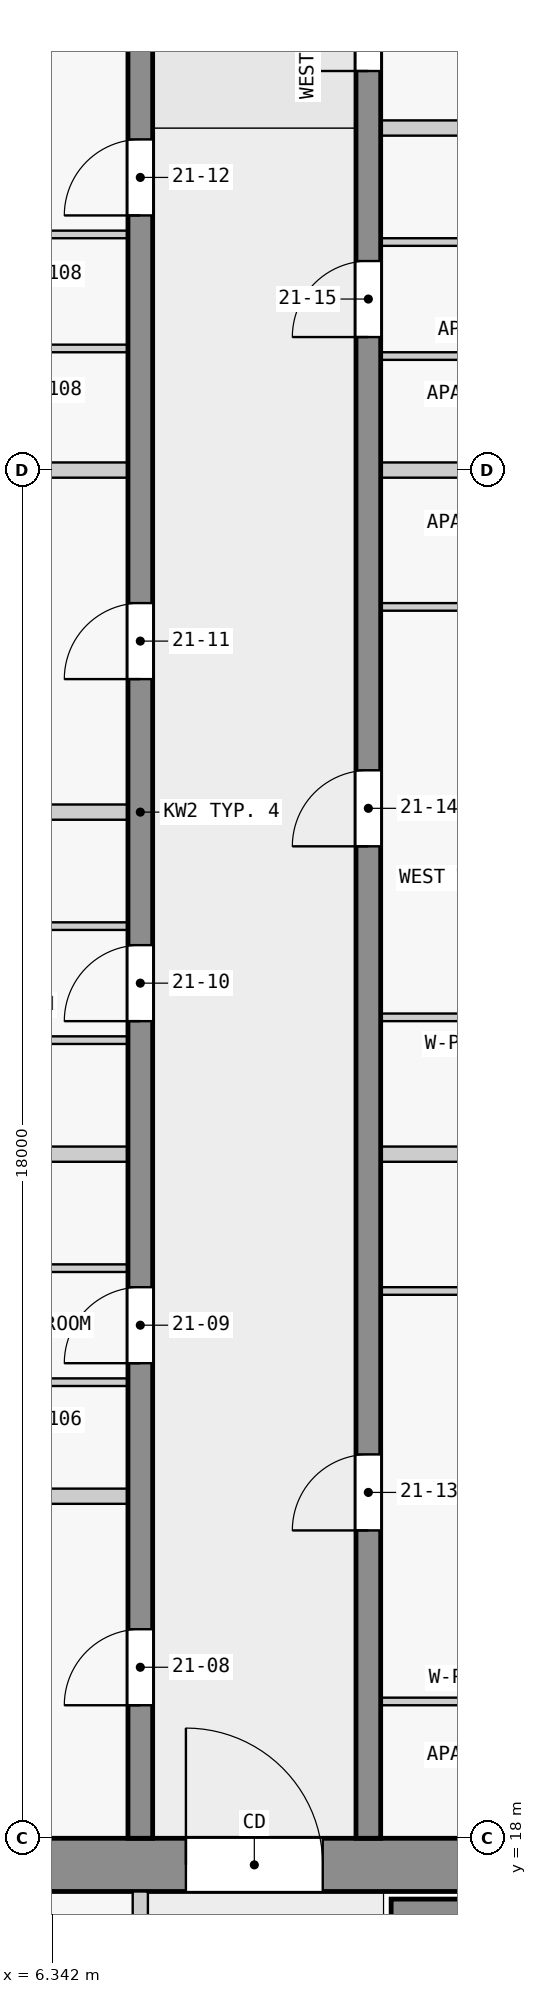
"""IFC4 building model, lengths in metres.
Left out: names, types, materials, properties, quantities, classifications, styles, units other than length and angle.
Written with IfcOpenShell. Run it as: python <this file> out.ifc"""

import sys

from ifc_helpers import new_model, si_unit, direction, frame, frame_2d, origin, place, context, subcontext, project, spatial, rectangle, extrude, element, fill, save


model = new_model("IFC4")
c1 = context("Model", 3, precision=1e-05, world=origin(), true_north=direction((0.0, 1.0)))
c2 = subcontext(c1, "Body", "Model", "MODEL_VIEW")
j1 = project(units=[si_unit("LENGTHUNIT", "METRE"), si_unit("PLANEANGLEUNIT", "RADIAN")], contexts=[c1])
p1 = place(None, origin())
s1 = spatial("IfcSite", under=j1, at=p1, CompositionType="ELEMENT")
p2 = place(p1, origin())
s2 = spatial("IfcBuilding", under=s1, at=p2, CompositionType="ELEMENT")
p3 = place(p2, frame((0.0, 0.0, 85.3)))
s3 = spatial("IfcBuildingStorey", under=s2, at=p3, CompositionType="ELEMENT", Elevation=85.3)
p4 = place(p3, frame((1.6, 17.65, 0.0), z_axis=(0.0, 0.0, 1.0), x_axis=(1.0, 0.0, 0.0)))
e1 = element("IfcWall", 1, at=p4, inside=s3, PredefinedType="SHEAR", context=c2, shape_type="SweptSolid", body=[
    extrude(rectangle(XDim=20.9, YDim=0.7, at=frame_2d((10.45, 0.0))), origin(), (0.0, 0.0, 1.0), 3.25),
])
p5 = place(p4, frame((6.5, 0.0, 0.0)))
e2 = element("IfcOpeningElement", 2, at=p5, cuts=e1, PredefinedType="OPENING", context=c2, shape_type="SweptSolid", body=[
    extrude(rectangle(XDim=1.8, YDim=2.1, at=frame_2d((0.9, 1.05))), frame((0.0, 0.36, 0.0), z_axis=(0.0, -1.0, 0.0), x_axis=(1.0, 0.0, 0.0)), (0.0, 0.0, 1.0), 0.72),
])
p6 = place(p3, frame((10.8, 17.05, 0.0), z_axis=(0.0, 0.0, 1.0), x_axis=(1.0, 0.0, 0.0)))
e3 = element("IfcWall", 3, at=p6, inside=s3, PredefinedType="SHEAR", context=c2, shape_type="SweptSolid", body=[
    extrude(rectangle(XDim=7.8, YDim=0.3, at=frame_2d((3.9, 0.0))), origin(), (0.0, 0.0, 1.0), 3.25),
])
p7 = place(p3, frame((7.5, 18.0, 0.0), z_axis=(0.0, 0.0, 1.0), x_axis=(0.0, 1.0, 0.0)))
e4 = element("IfcWall", 4, at=p7, inside=s3, PredefinedType="SHEAR", context=c2, shape_type="SweptSolid", body=[
    extrude(rectangle(XDim=27.0, YDim=0.325, at=frame_2d((13.5, 0.0))), origin(), (0.0, 0.0, 1.0), 3.25),
])
p8 = place(p7, frame((1.75, 0.0, 0.0)))
e5 = element("IfcOpeningElement", 5, at=p8, cuts=e4, PredefinedType="OPENING", context=c2, shape_type="SweptSolid", body=[
    extrude(rectangle(XDim=1.0, YDim=2.1, at=frame_2d((0.5, 1.05))), frame((0.0, 0.172, 0.0), z_axis=(0.0, -1.0, 0.0), x_axis=(1.0, 0.0, 0.0)), (0.0, 0.0, 1.0), 0.345),
])
p9 = place(p7, frame((6.25, 0.0, 0.0)))
e6 = element("IfcOpeningElement", 6, at=p9, cuts=e4, PredefinedType="OPENING", context=c2, shape_type="SweptSolid", body=[
    extrude(rectangle(XDim=1.0, YDim=2.1, at=frame_2d((0.5, 1.05))), frame((0.0, 0.172, 0.0), z_axis=(0.0, -1.0, 0.0), x_axis=(1.0, 0.0, 0.0)), (0.0, 0.0, 1.0), 0.345),
])
p10 = place(p7, frame((10.75, 0.0, 0.0)))
e7 = element("IfcOpeningElement", 7, at=p10, cuts=e4, PredefinedType="OPENING", context=c2, shape_type="SweptSolid", body=[
    extrude(rectangle(XDim=1.0, YDim=2.1, at=frame_2d((0.5, 1.05))), frame((0.0, 0.172, 0.0), z_axis=(0.0, -1.0, 0.0), x_axis=(1.0, 0.0, 0.0)), (0.0, 0.0, 1.0), 0.345),
])
p11 = place(p7, frame((15.25, 0.0, 0.0)))
e8 = element("IfcOpeningElement", 8, at=p11, cuts=e4, PredefinedType="OPENING", context=c2, shape_type="SweptSolid", body=[
    extrude(rectangle(XDim=1.0, YDim=2.1, at=frame_2d((0.5, 1.05))), frame((0.0, 0.172, 0.0), z_axis=(0.0, -1.0, 0.0), x_axis=(1.0, 0.0, 0.0)), (0.0, 0.0, 1.0), 0.345),
])
p12 = place(p7, frame((21.35, 0.0, 0.0)))
e9 = element("IfcOpeningElement", 9, at=p12, cuts=e4, PredefinedType="OPENING", context=c2, shape_type="SweptSolid", body=[
    extrude(rectangle(XDim=1.0, YDim=2.1, at=frame_2d((0.5, 1.05))), frame((0.0, 0.172, 0.0), z_axis=(0.0, -1.0, 0.0), x_axis=(1.0, 0.0, 0.0)), (0.0, 0.0, 1.0), 0.345),
])
p13 = place(p3, frame((10.5, 18.0, 0.0), z_axis=(0.0, 0.0, 1.0), x_axis=(0.0, 1.0, 0.0)))
e10 = element("IfcWall", 10, at=p13, inside=s3, PredefinedType="SHEAR", context=c2, shape_type="SweptSolid", body=[
    extrude(rectangle(XDim=27.0, YDim=0.325, at=frame_2d((13.5, 0.0))), origin(), (0.0, 0.0, 1.0), 3.25),
])
p14 = place(p13, frame((4.05, 0.0, 0.0)))
e11 = element("IfcOpeningElement", 11, at=p14, cuts=e10, PredefinedType="OPENING", context=c2, shape_type="SweptSolid", body=[
    extrude(rectangle(XDim=1.0, YDim=2.1, at=frame_2d((0.5, 1.05))), frame((0.0, 0.172, 0.0), z_axis=(0.0, -1.0, 0.0), x_axis=(1.0, 0.0, 0.0)), (0.0, 0.0, 1.0), 0.345),
])
p15 = place(p13, frame((13.05, 0.0, 0.0)))
e12 = element("IfcOpeningElement", 12, at=p15, cuts=e10, PredefinedType="OPENING", context=c2, shape_type="SweptSolid", body=[
    extrude(rectangle(XDim=1.0, YDim=2.1, at=frame_2d((0.5, 1.05))), frame((0.0, 0.172, 0.0), z_axis=(0.0, -1.0, 0.0), x_axis=(1.0, 0.0, 0.0)), (0.0, 0.0, 1.0), 0.345),
])
p16 = place(p13, frame((19.75, 0.0, 0.0)))
e13 = element("IfcOpeningElement", 13, at=p16, cuts=e10, PredefinedType="OPENING", context=c2, shape_type="SweptSolid", body=[
    extrude(rectangle(XDim=1.0, YDim=2.1, at=frame_2d((0.5, 1.05))), frame((0.0, 0.172, 0.0), z_axis=(0.0, -1.0, 0.0), x_axis=(1.0, 0.0, 0.0)), (0.0, 0.0, 1.0), 0.345),
])
p17 = place(p13, frame((23.25, 0.0, 0.0)))
e14 = element("IfcOpeningElement", 14, at=p17, cuts=e10, PredefinedType="OPENING", context=c2, shape_type="SweptSolid", body=[
    extrude(rectangle(XDim=0.9, YDim=2.1, at=frame_2d((0.45, 1.05))), frame((0.0, 0.172, 0.0), z_axis=(0.0, -1.0, 0.0), x_axis=(1.0, 0.0, 0.0)), (0.0, 0.0, 1.0), 0.345),
])
p18 = place(p13, frame((25.45, 0.0, 0.0)))
e15 = element("IfcOpeningElement", 15, at=p18, cuts=e10, PredefinedType="OPENING", context=c2, shape_type="SweptSolid", body=[
    extrude(rectangle(XDim=1.0, YDim=2.1, at=frame_2d((0.5, 1.05))), frame((0.0, 0.172, 0.0), z_axis=(0.0, -1.0, 0.0), x_axis=(1.0, 0.0, 0.0)), (0.0, 0.0, 1.0), 0.345),
])
p19 = place(p3, frame((7.5, 10.1, 0.0), z_axis=(0.0, 0.0, 1.0), x_axis=(0.0, 1.0, 0.0)))
e16 = element("IfcWall", 16, at=p19, inside=s3, PredefinedType="PARTITIONING", context=c2, shape_type="SweptSolid", body=[
    extrude(rectangle(XDim=7.2, YDim=0.2, at=frame_2d((3.6, 0.0))), origin(), (0.0, 0.0, 1.0), 3.25),
])
p20 = place(p19, frame((0.75, 0.0, 0.0)))
e17 = element("IfcOpeningElement", 17, at=p20, cuts=e16, PredefinedType="OPENING", context=c2, shape_type="SweptSolid", body=[
    extrude(rectangle(XDim=0.9, YDim=2.1, at=frame_2d((0.45, 1.05))), frame((0.0, 0.11, 0.0), z_axis=(0.0, -1.0, 0.0), x_axis=(1.0, 0.0, 0.0)), (0.0, 0.0, 1.0), 0.22),
])
p21 = place(p19, frame((3.175, 0.0, 0.0)))
e18 = element("IfcOpeningElement", 18, at=p21, cuts=e16, PredefinedType="OPENING", context=c2, shape_type="SweptSolid", body=[
    extrude(rectangle(XDim=0.9, YDim=2.1, at=frame_2d((0.45, 1.05))), frame((0.0, 0.11, 0.0), z_axis=(0.0, -1.0, 0.0), x_axis=(1.0, 0.0, 0.0)), (0.0, 0.0, 1.0), 0.22),
])
p22 = place(p19, frame((5.25, 0.0, 0.0)))
e19 = element("IfcOpeningElement", 19, at=p22, cuts=e16, PredefinedType="OPENING", context=c2, shape_type="SweptSolid", body=[
    extrude(rectangle(XDim=0.9, YDim=2.1, at=frame_2d((0.45, 1.05))), frame((0.0, 0.11, 0.0), z_axis=(0.0, -1.0, 0.0), x_axis=(1.0, 0.0, 0.0)), (0.0, 0.0, 1.0), 0.22),
])
p23 = place(p3, frame((14.062, 19.8, 0.0), z_axis=(0.0, 0.0, 1.0), x_axis=(-1.0, 0.0, 0.0)))
e20 = element("IfcWall", 20, at=p23, inside=s3, PredefinedType="PARTITIONING", context=c2, shape_type="SweptSolid", body=[
    extrude(rectangle(XDim=3.4, YDim=0.1, at=frame_2d((1.7, 0.0))), origin(), (0.0, 0.0, 1.0), 3.25),
])
p24 = place(p23, frame((1.25, 0.0, 0.0)))
e21 = element("IfcOpeningElement", 21, at=p24, cuts=e20, PredefinedType="OPENING", context=c2, shape_type="SweptSolid", body=[
    extrude(rectangle(XDim=0.9, YDim=2.1, at=frame_2d((0.45, 1.05))), frame((0.0, 0.06, 0.0), z_axis=(0.0, -1.0, 0.0), x_axis=(1.0, 0.0, 0.0)), (0.0, 0.0, 1.0), 0.12),
])
p25 = place(p3, frame((7.337, 22.5, 0.0), z_axis=(0.0, 0.0, 1.0), x_axis=(-1.0, 0.0, 0.0)))
e22 = element("IfcWall", 22, at=p25, inside=s3, PredefinedType="PARTITIONING", context=c2, shape_type="SweptSolid", body=[
    extrude(rectangle(XDim=7.188, YDim=0.2, at=frame_2d((3.594, 0.0))), origin(), (0.0, 0.0, 1.0), 3.25),
])
p26 = place(p3, frame((7.337, 24.0, 0.0), z_axis=(0.0, 0.0, 1.0), x_axis=(-1.0, 0.0, 0.0)))
e23 = element("IfcWall", 23, at=p26, inside=s3, PredefinedType="PARTITIONING", context=c2, shape_type="SweptSolid", body=[
    extrude(rectangle(XDim=3.4, YDim=0.1, at=frame_2d((1.7, 0.0))), origin(), (0.0, 0.0, 1.0), 3.25),
])
p27 = place(p26, frame((1.25, 0.0, 0.0)))
e24 = element("IfcOpeningElement", 24, at=p27, cuts=e23, PredefinedType="OPENING", context=c2, shape_type="SweptSolid", body=[
    extrude(rectangle(XDim=0.9, YDim=2.1, at=frame_2d((0.45, 1.05))), frame((0.0, 0.06, 0.0), z_axis=(0.0, -1.0, 0.0), x_axis=(1.0, 0.0, 0.0)), (0.0, 0.0, 1.0), 0.12),
])
p28 = place(p3, frame((10.663, 25.2, 0.0), z_axis=(0.0, 0.0, 1.0), x_axis=(1.0, 0.0, 0.0)))
e25 = element("IfcWall", 25, at=p28, inside=s3, PredefinedType="PARTITIONING", context=c2, shape_type="SweptSolid", body=[
    extrude(rectangle(XDim=3.35, YDim=0.1, at=frame_2d((1.675, 0.0))), origin(), (0.0, 0.0, 1.0), 3.25),
])
p29 = place(p28, frame((1.25, 0.0, 0.0)))
e26 = element("IfcOpeningElement", 26, at=p29, cuts=e25, PredefinedType="OPENING", context=c2, shape_type="SweptSolid", body=[
    extrude(rectangle(XDim=0.9, YDim=2.1, at=frame_2d((0.45, 1.05))), frame((0.0, 0.06, 0.0), z_axis=(0.0, -1.0, 0.0), x_axis=(1.0, 0.0, 0.0)), (0.0, 0.0, 1.0), 0.12),
])
p30 = place(p3, frame((3.938, 25.5, 0.0), z_axis=(0.0, 0.0, 1.0), x_axis=(1.0, 0.0, 0.0)))
e27 = element("IfcWall", 27, at=p30, inside=s3, PredefinedType="PARTITIONING", context=c2, shape_type="SweptSolid", body=[
    extrude(rectangle(XDim=3.4, YDim=0.1, at=frame_2d((1.7, 0.0))), origin(), (0.0, 0.0, 1.0), 3.25),
])
p31 = place(p30, frame((1.25, 0.0, 0.0)))
e28 = element("IfcOpeningElement", 28, at=p31, cuts=e27, PredefinedType="OPENING", context=c2, shape_type="SweptSolid", body=[
    extrude(rectangle(XDim=0.9, YDim=2.1, at=frame_2d((0.45, 1.05))), frame((0.0, 0.06, 0.0), z_axis=(0.0, -1.0, 0.0), x_axis=(1.0, 0.0, 0.0)), (0.0, 0.0, 1.0), 0.12),
])
for number, where, z_axis, x_axis in (
    (29, (7.337, 27.0, 0.0), (0.0, 0.0, 1.0), (-1.0, 0.0, 0.0)),
    (30, (13.962, 27.0, 0.0), (0.0, 0.0, 1.0), (-1.0, 0.0, 0.0)),
):
    element("IfcWall", number, at=place(p3, frame(where, z_axis=z_axis, x_axis=x_axis)), inside=s3, PredefinedType="PARTITIONING", context=c2, shape_type="SweptSolid", body=[
        extrude(rectangle(XDim=3.3, YDim=0.2, at=frame_2d((1.65, 0.0))), origin(), (0.0, 0.0, 1.0), 3.25),
    ])
p32 = place(p3, frame((7.337, 28.5, 0.0), z_axis=(0.0, 0.0, 1.0), x_axis=(-1.0, 0.0, 0.0)))
e31 = element("IfcWall", 31, at=p32, inside=s3, PredefinedType="PARTITIONING", context=c2, shape_type="SweptSolid", body=[
    extrude(rectangle(XDim=3.4, YDim=0.1, at=frame_2d((1.7, 0.0))), origin(), (0.0, 0.0, 1.0), 3.25),
])
p33 = place(p32, frame((1.25, 0.0, 0.0)))
e32 = element("IfcOpeningElement", 32, at=p33, cuts=e31, PredefinedType="OPENING", context=c2, shape_type="SweptSolid", body=[
    extrude(rectangle(XDim=0.9, YDim=2.1, at=frame_2d((0.45, 1.05))), frame((0.0, 0.06, 0.0), z_axis=(0.0, -1.0, 0.0), x_axis=(1.0, 0.0, 0.0)), (0.0, 0.0, 1.0), 0.12),
])
p34 = place(p3, frame((14.012, 28.8, 0.0), z_axis=(0.0, 0.0, 1.0), x_axis=(-1.0, 0.0, 0.0)))
e33 = element("IfcWall", 33, at=p34, inside=s3, PredefinedType="PARTITIONING", context=c2, shape_type="SweptSolid", body=[
    extrude(rectangle(XDim=3.35, YDim=0.1, at=frame_2d((1.675, 0.0))), origin(), (0.0, 0.0, 1.0), 3.25),
])
p35 = place(p34, frame((1.25, 0.0, 0.0)))
e34 = element("IfcOpeningElement", 34, at=p35, cuts=e33, PredefinedType="OPENING", context=c2, shape_type="SweptSolid", body=[
    extrude(rectangle(XDim=0.9, YDim=2.1, at=frame_2d((0.45, 1.05))), frame((0.0, 0.06, 0.0), z_axis=(0.0, -1.0, 0.0), x_axis=(1.0, 0.0, 0.0)), (0.0, 0.0, 1.0), 0.12),
])
p36 = place(p3, frame((3.938, 30.0, 0.0), z_axis=(0.0, 0.0, 1.0), x_axis=(1.0, 0.0, 0.0)))
e35 = element("IfcWall", 35, at=p36, inside=s3, PredefinedType="PARTITIONING", context=c2, shape_type="SweptSolid", body=[
    extrude(rectangle(XDim=3.4, YDim=0.1, at=frame_2d((1.7, 0.0))), origin(), (0.0, 0.0, 1.0), 3.25),
])
p37 = place(p36, frame((1.25, 0.0, 0.0)))
e36 = element("IfcOpeningElement", 36, at=p37, cuts=e35, PredefinedType="OPENING", context=c2, shape_type="SweptSolid", body=[
    extrude(rectangle(XDim=0.9, YDim=2.1, at=frame_2d((0.45, 1.05))), frame((0.0, 0.06, 0.0), z_axis=(0.0, -1.0, 0.0), x_axis=(1.0, 0.0, 0.0)), (0.0, 0.0, 1.0), 0.12),
])
p38 = place(p3, frame((7.337, 31.5, 0.0), z_axis=(0.0, 0.0, 1.0), x_axis=(-1.0, 0.0, 0.0)))
e37 = element("IfcWall", 37, at=p38, inside=s3, PredefinedType="PARTITIONING", context=c2, shape_type="SweptSolid", body=[
    extrude(rectangle(XDim=3.3, YDim=0.2, at=frame_2d((1.65, 0.0))), origin(), (0.0, 0.0, 1.0), 3.25),
])
p39 = place(p3, frame((10.663, 34.2, 0.0), z_axis=(0.0, 0.0, 1.0), x_axis=(1.0, 0.0, 0.0)))
e38 = element("IfcWall", 38, at=p39, inside=s3, PredefinedType="PARTITIONING", context=c2, shape_type="SweptSolid", body=[
    extrude(rectangle(XDim=3.4, YDim=0.1, at=frame_2d((1.7, 0.0))), origin(), (0.0, 0.0, 1.0), 3.25),
])
p40 = place(p39, frame((1.25, 0.0, 0.0)))
e39 = element("IfcOpeningElement", 39, at=p40, cuts=e38, PredefinedType="OPENING", context=c2, shape_type="SweptSolid", body=[
    extrude(rectangle(XDim=0.9, YDim=2.1, at=frame_2d((0.45, 1.05))), frame((0.0, 0.06, 0.0), z_axis=(0.0, -1.0, 0.0), x_axis=(1.0, 0.0, 0.0)), (0.0, 0.0, 1.0), 0.12),
])
p41 = place(p3, frame((7.337, 36.0, 0.0), z_axis=(0.0, 0.0, 1.0), x_axis=(-1.0, 0.0, 0.0)))
e40 = element("IfcWall", 40, at=p41, inside=s3, PredefinedType="PARTITIONING", context=c2, shape_type="SweptSolid", body=[
    extrude(rectangle(XDim=5.938, YDim=0.2, at=frame_2d((2.969, 0.0))), origin(), (0.0, 0.0, 1.0), 3.25),
])
p42 = place(p3, frame((14.062, 36.0, 0.0), z_axis=(0.0, 0.0, 1.0), x_axis=(-1.0, 0.0, 0.0)))
e41 = element("IfcWall", 41, at=p42, inside=s3, PredefinedType="PARTITIONING", context=c2, shape_type="SweptSolid", body=[
    extrude(rectangle(XDim=3.4, YDim=0.2, at=frame_2d((1.7, 0.0))), origin(), (0.0, 0.0, 1.0), 3.25),
])
p43 = place(p3, frame((14.062, 37.5, 0.0), z_axis=(0.0, 0.0, 1.0), x_axis=(-1.0, 0.0, 0.0)))
e42 = element("IfcWall", 42, at=p43, inside=s3, PredefinedType="PARTITIONING", context=c2, shape_type="SweptSolid", body=[
    extrude(rectangle(XDim=3.4, YDim=0.1, at=frame_2d((1.7, 0.0))), origin(), (0.0, 0.0, 1.0), 3.25),
])
p44 = place(p43, frame((1.25, 0.0, 0.0)))
e43 = element("IfcOpeningElement", 43, at=p44, cuts=e42, PredefinedType="OPENING", context=c2, shape_type="SweptSolid", body=[
    extrude(rectangle(XDim=0.9, YDim=2.1, at=frame_2d((0.45, 1.05))), frame((0.0, 0.06, 0.0), z_axis=(0.0, -1.0, 0.0), x_axis=(1.0, 0.0, 0.0)), (0.0, 0.0, 1.0), 0.12),
])
p45 = place(p3, frame((7.337, 37.6, 0.0), z_axis=(0.0, 0.0, 1.0), x_axis=(-1.0, 0.0, 0.0)))
e44 = element("IfcWall", 44, at=p45, inside=s3, PredefinedType="PARTITIONING", context=c2, shape_type="SweptSolid", body=[
    extrude(rectangle(XDim=3.4, YDim=0.1, at=frame_2d((1.7, 0.0))), origin(), (0.0, 0.0, 1.0), 3.25),
])
p46 = place(p3, frame((10.663, 39.0, 0.0), z_axis=(0.0, 0.0, 1.0), x_axis=(1.0, 0.0, 0.0)))
e45 = element("IfcWall", 45, at=p46, inside=s3, PredefinedType="PARTITIONING", context=c2, shape_type="SweptSolid", body=[
    extrude(rectangle(XDim=3.4, YDim=0.1, at=frame_2d((1.7, 0.0))), origin(), (0.0, 0.0, 1.0), 3.25),
])
p47 = place(p46, frame((1.25, 0.0, 0.0)))
e46 = element("IfcOpeningElement", 46, at=p47, cuts=e45, PredefinedType="OPENING", context=c2, shape_type="SweptSolid", body=[
    extrude(rectangle(XDim=0.9, YDim=2.1, at=frame_2d((0.45, 1.05))), frame((0.0, 0.06, 0.0), z_axis=(0.0, -1.0, 0.0), x_axis=(1.0, 0.0, 0.0)), (0.0, 0.0, 1.0), 0.12),
])
p48 = place(p3, frame((7.337, 39.1, 0.0), z_axis=(0.0, 0.0, 1.0), x_axis=(-1.0, 0.0, 0.0)))
e47 = element("IfcWall", 47, at=p48, inside=s3, PredefinedType="PARTITIONING", context=c2, shape_type="SweptSolid", body=[
    extrude(rectangle(XDim=3.4, YDim=0.1, at=frame_2d((1.7, 0.0))), origin(), (0.0, 0.0, 1.0), 3.25),
])
p49 = place(p48, frame((1.25, 0.0, 0.0)))
e48 = element("IfcOpeningElement", 48, at=p49, cuts=e47, PredefinedType="OPENING", context=c2, shape_type="SweptSolid", body=[
    extrude(rectangle(XDim=0.9, YDim=2.1, at=frame_2d((0.45, 1.05))), frame((0.0, 0.06, 0.0), z_axis=(0.0, -1.0, 0.0), x_axis=(1.0, 0.0, 0.0)), (0.0, 0.0, 1.0), 0.12),
])
p50 = place(p3, frame((13.962, 40.5, 0.0), z_axis=(0.0, 0.0, 1.0), x_axis=(-1.0, 0.0, 0.0)))
e49 = element("IfcWall", 49, at=p50, inside=s3, PredefinedType="PARTITIONING", context=c2, shape_type="SweptSolid", body=[
    extrude(rectangle(XDim=3.3, YDim=0.2, at=frame_2d((1.65, 0.0))), origin(), (0.0, 0.0, 1.0), 3.25),
])
p51 = place(p5, origin())
e50 = element("IfcDoor", 50, at=p51, inside=s3, OperationType="DOUBLE_DOOR_SINGLE_SWING", PredefinedType="DOOR", context=c2, shape_type="SweptSolid", body=[
    extrude(rectangle(XDim=1.8, YDim=2.1, at=frame_2d((0.9, 1.05))), frame((0.0, 0.025, 0.0), z_axis=(0.0, -1.0, 0.0), x_axis=(1.0, 0.0, 0.0)), (0.0, 0.0, 1.0), 0.05),
])
fill(e2, e50)
p52 = place(p8, origin())
e51 = element("IfcDoor", 51, at=p52, inside=s3, OperationType="SINGLE_SWING_LEFT", PredefinedType="DOOR", context=c2, shape_type="SweptSolid", body=[
    extrude(rectangle(XDim=1.0, YDim=2.1, at=frame_2d((0.5, 1.05))), frame((0.0, 0.025, 0.0), z_axis=(0.0, -1.0, 0.0), x_axis=(1.0, 0.0, 0.0)), (0.0, 0.0, 1.0), 0.05),
])
fill(e5, e51)
p53 = place(p9, origin())
e52 = element("IfcDoor", 52, at=p53, inside=s3, OperationType="SINGLE_SWING_LEFT", PredefinedType="DOOR", context=c2, shape_type="SweptSolid", body=[
    extrude(rectangle(XDim=1.0, YDim=2.1, at=frame_2d((0.5, 1.05))), frame((0.0, 0.025, 0.0), z_axis=(0.0, -1.0, 0.0), x_axis=(1.0, 0.0, 0.0)), (0.0, 0.0, 1.0), 0.05),
])
fill(e6, e52)
p54 = place(p10, origin())
e53 = element("IfcDoor", 53, at=p54, inside=s3, OperationType="SINGLE_SWING_LEFT", PredefinedType="DOOR", context=c2, shape_type="SweptSolid", body=[
    extrude(rectangle(XDim=1.0, YDim=2.1, at=frame_2d((0.5, 1.05))), frame((0.0, 0.025, 0.0), z_axis=(0.0, -1.0, 0.0), x_axis=(1.0, 0.0, 0.0)), (0.0, 0.0, 1.0), 0.05),
])
fill(e7, e53)
p55 = place(p11, origin())
e54 = element("IfcDoor", 54, at=p55, inside=s3, OperationType="SINGLE_SWING_RIGHT", PredefinedType="DOOR", context=c2, shape_type="SweptSolid", body=[
    extrude(rectangle(XDim=1.0, YDim=2.1, at=frame_2d((0.5, 1.05))), frame((0.0, 0.025, 0.0), z_axis=(0.0, -1.0, 0.0), x_axis=(1.0, 0.0, 0.0)), (0.0, 0.0, 1.0), 0.05),
])
fill(e8, e54)
p56 = place(p12, origin())
e55 = element("IfcDoor", 55, at=p56, inside=s3, OperationType="SINGLE_SWING_RIGHT", PredefinedType="DOOR", context=c2, shape_type="SweptSolid", body=[
    extrude(rectangle(XDim=1.0, YDim=2.1, at=frame_2d((0.5, 1.05))), frame((0.0, 0.025, 0.0), z_axis=(0.0, -1.0, 0.0), x_axis=(1.0, 0.0, 0.0)), (0.0, 0.0, 1.0), 0.05),
])
fill(e9, e55)
p57 = place(p14, origin())
e56 = element("IfcDoor", 56, at=p57, inside=s3, OperationType="SINGLE_SWING_LEFT", PredefinedType="DOOR", context=c2, shape_type="SweptSolid", body=[
    extrude(rectangle(XDim=1.0, YDim=2.1, at=frame_2d((0.5, 1.05))), frame((0.0, 0.025, 0.0), z_axis=(0.0, -1.0, 0.0), x_axis=(1.0, 0.0, 0.0)), (0.0, 0.0, 1.0), 0.05),
])
fill(e11, e56)
p58 = place(p15, origin())
e57 = element("IfcDoor", 57, at=p58, inside=s3, OperationType="SINGLE_SWING_RIGHT", PredefinedType="DOOR", context=c2, shape_type="SweptSolid", body=[
    extrude(rectangle(XDim=1.0, YDim=2.1, at=frame_2d((0.5, 1.05))), frame((0.0, 0.025, 0.0), z_axis=(0.0, -1.0, 0.0), x_axis=(1.0, 0.0, 0.0)), (0.0, 0.0, 1.0), 0.05),
])
fill(e12, e57)
p59 = place(p16, origin())
e58 = element("IfcDoor", 58, at=p59, inside=s3, OperationType="SINGLE_SWING_RIGHT", PredefinedType="DOOR", context=c2, shape_type="SweptSolid", body=[
    extrude(rectangle(XDim=1.0, YDim=2.1, at=frame_2d((0.5, 1.05))), frame((0.0, 0.025, 0.0), z_axis=(0.0, -1.0, 0.0), x_axis=(1.0, 0.0, 0.0)), (0.0, 0.0, 1.0), 0.05),
])
fill(e13, e58)
p60 = place(p17, origin())
e59 = element("IfcDoor", 59, at=p60, inside=s3, OperationType="SINGLE_SWING_RIGHT", PredefinedType="DOOR", context=c2, shape_type="SweptSolid", body=[
    extrude(rectangle(XDim=0.9, YDim=2.1, at=frame_2d((0.45, 1.05))), frame((0.0, 0.025, 0.0), z_axis=(0.0, -1.0, 0.0), x_axis=(1.0, 0.0, 0.0)), (0.0, 0.0, 1.0), 0.05),
])
fill(e14, e59)
save(model, sys.argv[1])
